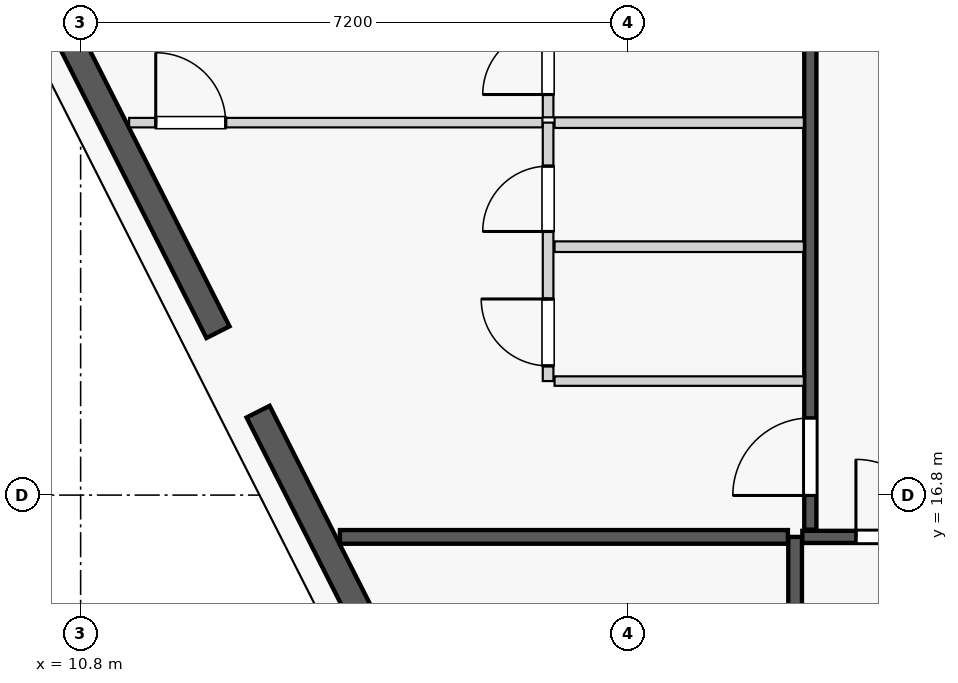
"""IFC4 building model, lengths in metres.
Left out: names, types, materials, properties, quantities, classifications, styles, units other than length and angle.
Written with IfcOpenShell. Run it as: python <this file> out.ifc"""

import sys

from ifc_helpers import new_model, si_unit, direction, frame, frame_2d, origin, origin_2d, place, context, subcontext, project, spatial, rectangle, extrude, element, fill, save


model = new_model("IFC4")
c1 = context("Model", 3, precision=1e-05, world=origin(), true_north=direction((0.0, 1.0)))
c2 = subcontext(c1, "Body", "Model", "MODEL_VIEW")
j1 = project(units=[si_unit("LENGTHUNIT", "METRE"), si_unit("PLANEANGLEUNIT", "RADIAN")], contexts=[c1])
p1 = place(None, origin())
s1 = spatial("IfcSite", under=j1, at=p1, CompositionType="ELEMENT")
p2 = place(p1, origin())
s2 = spatial("IfcBuilding", under=s1, at=p2, CompositionType="ELEMENT")
p3 = place(p2, frame((0.0, 0.0, 186.1)))
s3 = spatial("IfcBuildingStorey", under=s2, at=p3, CompositionType="ELEMENT", Elevation=186.1)
p4 = place(p3, frame((12.942, 18.429, 0.0), z_axis=(0.0, 0.0, 1.0), x_axis=(1.0, 0.0, 0.0)))
e1 = element("IfcColumn", 1, at=p4, inside=s3, PredefinedType="COLUMN", context=c2, shape_type="SweptSolid", body=[
    extrude(rectangle(XDim=0.9, YDim=0.9, at=origin_2d()), origin(), (0.0, 0.0, 1.0), 3.55),
])
p5 = place(p3, frame((10.485, 23.137, 0.0), z_axis=(0.0, 0.0, 1.0), x_axis=(0.451447222193, -0.892297823361, 0.0)))
e2 = element("IfcWall", 2, at=p5, inside=s3, PredefinedType="STANDARD", context=c2, shape_type="SweptSolid", body=[
    extrude(rectangle(XDim=4.7, YDim=0.34, at=frame_2d((2.35, 0.0))), origin(), (0.0, 0.0, 1.0), 2.883),
])
p6 = place(p5, frame((0.246, 0.0, 0.75)))
e3 = element("IfcOpeningElement", 3, at=p6, cuts=e2, PredefinedType="OPENING", context=c2, shape_type="SweptSolid", body=[
    extrude(rectangle(XDim=1.1, YDim=1.983, at=frame_2d((0.55, 0.991))), frame((0.0, 0.18, 0.0), z_axis=(0.0, -1.0, 0.0), x_axis=(1.0, 0.0, 0.0)), (0.0, 0.0, 1.0), 0.36),
])
p7 = place(p5, frame((2.716, 0.0, 0.75)))
e4 = element("IfcOpeningElement", 4, at=p7, cuts=e2, PredefinedType="OPENING", context=c2, shape_type="SweptSolid", body=[
    extrude(rectangle(XDim=1.1, YDim=1.983, at=frame_2d((0.55, 0.991))), frame((0.0, 0.18, 0.0), z_axis=(0.0, -1.0, 0.0), x_axis=(1.0, 0.0, 0.0)), (0.0, 0.0, 1.0), 0.36),
])
p8 = place(p3, frame((13.135, 17.898, 0.0), z_axis=(0.0, 0.0, 1.0), x_axis=(0.451544279509, -0.892248711763, 0.0)))
e5 = element("IfcWall", 5, at=p8, inside=s3, PredefinedType="STANDARD", context=c2, shape_type="SweptSolid", body=[
    extrude(rectangle(XDim=4.91, YDim=0.34, at=frame_2d((2.455, 0.0))), origin(), (0.0, 0.0, 1.0), 2.883),
])
p9 = place(p8, frame((0.353, 0.0, 0.75)))
e6 = element("IfcOpeningElement", 6, at=p9, cuts=e5, PredefinedType="OPENING", context=c2, shape_type="SweptSolid", body=[
    extrude(rectangle(XDim=1.1, YDim=1.983, at=frame_2d((0.55, 0.991))), frame((0.0, 0.18, 0.0), z_axis=(0.0, -1.0, 0.0), x_axis=(1.0, 0.0, 0.0)), (0.0, 0.0, 1.0), 0.36),
])
p10 = place(p8, frame((2.959, 0.0, 0.75)))
e7 = element("IfcOpeningElement", 7, at=p10, cuts=e5, PredefinedType="OPENING", context=c2, shape_type="SweptSolid", body=[
    extrude(rectangle(XDim=1.1, YDim=1.983, at=frame_2d((0.55, 0.991))), frame((0.0, 0.18, 0.0), z_axis=(0.0, -1.0, 0.0), x_axis=(1.0, 0.0, 0.0)), (0.0, 0.0, 1.0), 0.36),
])
p11 = place(p3, frame((20.2, 5.968, 0.0), z_axis=(0.0, 0.0, 1.0), x_axis=(0.0, 1.0, 0.0)))
e8 = element("IfcWall", 8, at=p11, inside=s3, PredefinedType="PARTITIONING", context=c2, shape_type="SweptSolid", body=[
    extrude(rectangle(XDim=10.282, YDim=0.18, at=frame_2d((5.141, 0.0))), origin(), (0.0, 0.0, 1.0), 3.35),
])
p12 = place(p3, frame((20.295, 16.25, 0.0), z_axis=(0.0, 0.0, 1.0), x_axis=(1.0, 0.0, 0.0)))
e9 = element("IfcWall", 9, at=p12, inside=s3, PredefinedType="PARTITIONING", context=c2, shape_type="SweptSolid", body=[
    extrude(rectangle(XDim=8.467, YDim=0.16, at=frame_2d((4.233, 0.0))), origin(), (0.0, 0.0, 1.0), 3.35),
])
p13 = place(p12, frame((0.705, 0.0, 0.0)))
e10 = element("IfcOpeningElement", 10, at=p13, cuts=e9, PredefinedType="OPENING", context=c2, shape_type="SweptSolid", body=[
    extrude(rectangle(XDim=1.02, YDim=2.25, at=frame_2d((0.51, 1.125))), frame((0.0, 0.09, 0.0), z_axis=(0.0, -1.0, 0.0), x_axis=(1.0, 0.0, 0.0)), (0.0, 0.0, 1.0), 0.18),
])
p14 = place(p3, frame((14.211, 16.25, 0.0), z_axis=(0.0, 0.0, 1.0), x_axis=(1.0, 0.0, 0.0)))
e11 = element("IfcWall", 11, at=p14, inside=s3, PredefinedType="PARTITIONING", context=c2, shape_type="SweptSolid", body=[
    extrude(rectangle(XDim=5.894, YDim=0.18, at=frame_2d((2.947, 0.0))), origin(), (0.0, 0.0, 1.0), 3.35),
])
p15 = place(p3, frame((20.4, 16.345, 0.0), z_axis=(0.0, 0.0, 1.0), x_axis=(0.0, 1.0, 0.0)))
e12 = element("IfcWall", 12, at=p15, inside=s3, PredefinedType="PARTITIONING", context=c2, shape_type="SweptSolid", body=[
    extrude(rectangle(XDim=8.504, YDim=0.16, at=frame_2d((4.252, 0.0))), origin(), (0.0, 0.0, 1.0), 3.35),
])
p16 = place(p15, frame((0.45, 0.0, 0.0)))
e13 = element("IfcOpeningElement", 13, at=p16, cuts=e12, PredefinedType="OPENING", context=c2, shape_type="SweptSolid", body=[
    extrude(rectangle(XDim=1.02, YDim=2.25, at=frame_2d((0.51, 1.125))), frame((0.0, 0.09, 0.0), z_axis=(0.0, -1.0, 0.0), x_axis=(1.0, 0.0, 0.0)), (0.0, 0.0, 1.0), 0.18),
])
p17 = place(p3, frame((17.035, 18.3, 0.0), z_axis=(0.0, 0.0, 1.0), x_axis=(1.0, 0.0, 0.0)))
e14 = element("IfcWall", 14, at=p17, inside=s3, PredefinedType="PARTITIONING", context=c2, shape_type="SweptSolid", body=[
    extrude(rectangle(XDim=3.28, YDim=0.125, at=frame_2d((1.64, 0.0))), origin(), (0.0, 0.0, 1.0), 2.807),
])
p18 = place(p3, frame((16.95, 18.3, 0.0), z_axis=(0.0, 0.0, 1.0), x_axis=(0.0, 1.0, 0.0)))
e15 = element("IfcWall", 15, at=p18, inside=s3, PredefinedType="PLUMBINGWALL", context=c2, shape_type="SweptSolid", body=[
    extrude(rectangle(XDim=3.4, YDim=0.14, at=frame_2d((1.7, 0.0))), origin(), (0.0, 0.0, 1.0), 3.35),
])
p19 = place(p18, frame((0.2, 0.0, 0.0)))
e16 = element("IfcOpeningElement", 16, at=p19, cuts=e15, PredefinedType="OPENING", context=c2, shape_type="SweptSolid", body=[
    extrude(rectangle(XDim=0.88, YDim=2.15, at=frame_2d((0.44, 1.075))), frame((0.0, 0.08, 0.0), z_axis=(0.0, -1.0, 0.0), x_axis=(1.0, 0.0, 0.0)), (0.0, 0.0, 1.0), 0.16),
])
p20 = place(p18, frame((1.968, 0.0, 0.0)))
e17 = element("IfcOpeningElement", 17, at=p20, cuts=e15, PredefinedType="OPENING", context=c2, shape_type="SweptSolid", body=[
    extrude(rectangle(XDim=0.86, YDim=2.1, at=frame_2d((0.43, 1.05))), frame((0.0, 0.08, 0.0), z_axis=(0.0, -1.0, 0.0), x_axis=(1.0, 0.0, 0.0)), (0.0, 0.0, 1.0), 0.16),
])
p21 = place(p3, frame((16.95, 21.77, 0.0), z_axis=(0.0, 0.0, 1.0), x_axis=(0.0, 1.0, 0.0)))
e18 = element("IfcWall", 18, at=p21, inside=s3, PredefinedType="PLUMBINGWALL", context=c2, shape_type="SweptSolid", body=[
    extrude(rectangle(XDim=3.079, YDim=0.14, at=frame_2d((1.54, 0.0))), origin(), (0.0, 0.0, 1.0), 3.35),
])
p22 = place(p21, frame((0.3, 0.0, 0.0)))
e19 = element("IfcOpeningElement", 19, at=p22, cuts=e18, PredefinedType="OPENING", context=c2, shape_type="SweptSolid", body=[
    extrude(rectangle(XDim=0.86, YDim=2.1, at=frame_2d((0.43, 1.05))), frame((0.0, 0.08, 0.0), z_axis=(0.0, -1.0, 0.0), x_axis=(1.0, 0.0, 0.0)), (0.0, 0.0, 1.0), 0.16),
])
p23 = place(p3, frame((17.035, 21.7, 0.0), z_axis=(0.0, 0.0, 1.0), x_axis=(1.0, 0.0, 0.0)))
e20 = element("IfcWall", 20, at=p23, inside=s3, PredefinedType="PLUMBINGWALL", context=c2, shape_type="SweptSolid", body=[
    extrude(rectangle(XDim=3.28, YDim=0.14, at=frame_2d((1.64, 0.0))), origin(), (0.0, 0.0, 1.0), 3.35),
])
p24 = place(p3, frame((11.438, 21.7, 0.0), z_axis=(0.0, 0.0, 1.0), x_axis=(1.0, 0.0, 0.0)))
e21 = element("IfcWall", 21, at=p24, inside=s3, PredefinedType="PARTITIONING", context=c2, shape_type="SweptSolid", body=[
    extrude(rectangle(XDim=5.437, YDim=0.125, at=frame_2d((2.719, 0.0))), origin(), (0.0, 0.0, 1.0), 3.35),
])
p25 = place(p24, frame((0.35, 0.0, 0.0)))
e22 = element("IfcOpeningElement", 22, at=p25, cuts=e21, PredefinedType="OPENING", context=c2, shape_type="SweptSolid", body=[
    extrude(rectangle(XDim=0.92, YDim=2.15, at=frame_2d((0.46, 1.075))), frame((0.0, 0.073, 0.0), z_axis=(0.0, -1.0, 0.0), x_axis=(1.0, 0.0, 0.0)), (0.0, 0.0, 1.0), 0.145),
])
p26 = place(p3, frame((17.035, 20.068, 0.0), z_axis=(0.0, 0.0, 1.0), x_axis=(1.0, 0.0, 0.0)))
e23 = element("IfcWall", 23, at=p26, inside=s3, PredefinedType="PLUMBINGWALL", context=c2, shape_type="SweptSolid", body=[
    extrude(rectangle(XDim=3.28, YDim=0.14, at=frame_2d((1.64, 0.0))), origin(), (0.0, 0.0, 1.0), 3.35),
])
p27 = place(p6, origin())
e24 = element("IfcWindow", 24, at=p27, inside=s3, PartitioningType="SINGLE_PANEL", PredefinedType="WINDOW", context=c2, shape_type="SweptSolid", body=[
    extrude(rectangle(XDim=1.1, YDim=1.983, at=frame_2d((0.55, 0.991))), frame((0.0, 0.03, 0.0), z_axis=(0.0, -1.0, 0.0), x_axis=(1.0, 0.0, 0.0)), (0.0, 0.0, 1.0), 0.06),
])
fill(e3, e24)
p28 = place(p9, origin())
e25 = element("IfcWindow", 25, at=p28, inside=s3, PartitioningType="SINGLE_PANEL", PredefinedType="WINDOW", context=c2, shape_type="SweptSolid", body=[
    extrude(rectangle(XDim=1.1, YDim=1.983, at=frame_2d((0.55, 0.991))), frame((0.0, 0.03, 0.0), z_axis=(0.0, -1.0, 0.0), x_axis=(1.0, 0.0, 0.0)), (0.0, 0.0, 1.0), 0.06),
])
fill(e6, e25)
p29 = place(p13, origin())
e26 = element("IfcDoor", 26, at=p29, inside=s3, OperationType="SINGLE_SWING_LEFT", PredefinedType="DOOR", context=c2, shape_type="SweptSolid", body=[
    extrude(rectangle(XDim=1.02, YDim=2.25, at=frame_2d((0.51, 1.125))), frame((0.0, 0.025, 0.0), z_axis=(0.0, -1.0, 0.0), x_axis=(1.0, 0.0, 0.0)), (0.0, 0.0, 1.0), 0.05),
])
fill(e10, e26)
p30 = place(p19, origin())
e27 = element("IfcDoor", 27, at=p30, inside=s3, OperationType="SINGLE_SWING_RIGHT", PredefinedType="DOOR", context=c2, shape_type="SweptSolid", body=[
    extrude(rectangle(XDim=0.88, YDim=2.15, at=frame_2d((0.44, 1.075))), frame((0.0, 0.025, 0.0), z_axis=(0.0, -1.0, 0.0), x_axis=(1.0, 0.0, 0.0)), (0.0, 0.0, 1.0), 0.05),
])
fill(e16, e27)
p31 = place(p20, origin())
e28 = element("IfcDoor", 28, at=p31, inside=s3, OperationType="SINGLE_SWING_LEFT", PredefinedType="DOOR", context=c2, shape_type="SweptSolid", body=[
    extrude(rectangle(XDim=0.86, YDim=2.1, at=frame_2d((0.43, 1.05))), frame((0.0, 0.025, 0.0), z_axis=(0.0, -1.0, 0.0), x_axis=(1.0, 0.0, 0.0)), (0.0, 0.0, 1.0), 0.05),
])
fill(e17, e28)
p32 = place(p22, origin())
e29 = element("IfcDoor", 29, at=p32, inside=s3, OperationType="SINGLE_SWING_LEFT", PredefinedType="DOOR", context=c2, shape_type="SweptSolid", body=[
    extrude(rectangle(XDim=0.86, YDim=2.1, at=frame_2d((0.43, 1.05))), frame((0.0, 0.025, 0.0), z_axis=(0.0, -1.0, 0.0), x_axis=(1.0, 0.0, 0.0)), (0.0, 0.0, 1.0), 0.05),
])
fill(e19, e29)
p33 = place(p16, origin())
e30 = element("IfcDoor", 30, at=p33, inside=s3, OperationType="SINGLE_SWING_LEFT", PredefinedType="DOOR", context=c2, shape_type="SweptSolid", body=[
    extrude(rectangle(XDim=1.02, YDim=2.25, at=frame_2d((0.51, 1.125))), frame((0.0, 0.025, 0.0), z_axis=(0.0, -1.0, 0.0), x_axis=(1.0, 0.0, 0.0)), (0.0, 0.0, 1.0), 0.05),
])
fill(e13, e30)
p34 = place(p25, origin())
e31 = element("IfcDoor", 31, at=p34, inside=s3, OperationType="SINGLE_SWING_LEFT", PredefinedType="DOOR", context=c2, shape_type="SweptSolid", body=[
    extrude(rectangle(XDim=0.92, YDim=2.15, at=frame_2d((0.46, 1.075))), frame((0.0, 0.025, 0.0), z_axis=(0.0, -1.0, 0.0), x_axis=(1.0, 0.0, 0.0)), (0.0, 0.0, 1.0), 0.05),
])
fill(e22, e31)
p35 = place(p7, origin())
e32 = element("IfcWindow", 32, at=p35, inside=s3, PartitioningType="SINGLE_PANEL", PredefinedType="WINDOW", context=c2, shape_type="SweptSolid", body=[
    extrude(rectangle(XDim=1.1, YDim=1.983, at=frame_2d((0.55, 0.991))), frame((0.0, 0.03, 0.0), z_axis=(0.0, -1.0, 0.0), x_axis=(1.0, 0.0, 0.0)), (0.0, 0.0, 1.0), 0.06),
])
fill(e4, e32)
save(model, sys.argv[1])
